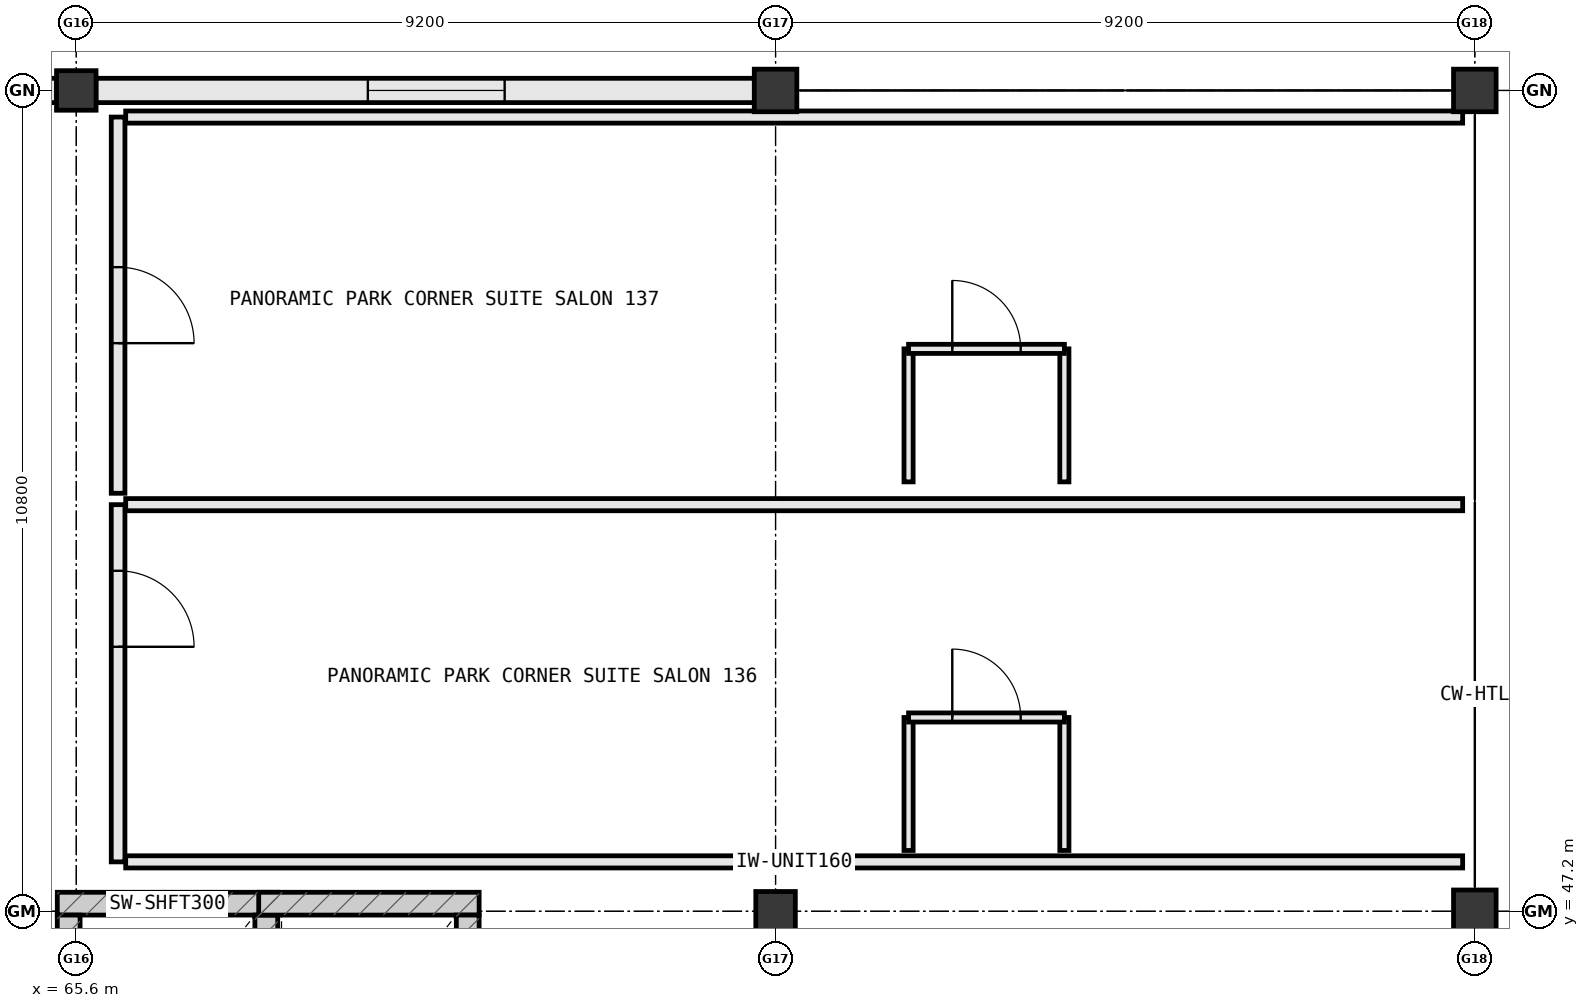
"""IFC4 building model, lengths in metres.
Left out: names, types, materials, properties, quantities, classifications, styles, units other than length and angle.
Written with IfcOpenShell. Run it as: python <this file> out.ifc"""

import sys

from ifc_helpers import new_model, si_unit, direction, frame, frame_2d, origin, origin_2d, place, context, subcontext, project, spatial, rectangle, extrude, element, fill, save


model = new_model("IFC4")
c1 = context("Model", 3, precision=1e-05, world=origin(), true_north=direction((0.0, 1.0)))
c2 = subcontext(c1, "Body", "Model", "MODEL_VIEW")
j1 = project(units=[si_unit("LENGTHUNIT", "METRE"), si_unit("PLANEANGLEUNIT", "RADIAN")], contexts=[c1])
p1 = place(None, origin())
s1 = spatial("IfcSite", under=j1, at=p1, CompositionType="ELEMENT")
p2 = place(p1, origin())
s2 = spatial("IfcBuilding", under=s1, at=p2, CompositionType="ELEMENT")
p3 = place(p2, frame((0.0, 0.0, 20.0)))
s3 = spatial("IfcBuildingStorey", under=s2, at=p3, CompositionType="ELEMENT", Elevation=20.0)
p4 = place(p3, frame((74.8, 47.2, 0.0), z_axis=(0.0, 0.0, 1.0), x_axis=(1.0, 0.0, 0.0)))
e1 = element("IfcColumn", 1, at=p4, inside=s3, PredefinedType="COLUMN", context=c2, shape_type="SweptSolid", body=[
    extrude(rectangle(XDim=0.52, YDim=0.52, at=origin_2d()), origin(), (0.0, 0.0, 1.0), 3.8),
])
for number, where, z_axis, x_axis in (
    (2, (74.8, 58.0, 0.0), (0.0, 0.0, 1.0), (1.0, 0.0, 0.0)),
    (3, (84.0, 47.2, 0.0), (0.0, 0.0, 1.0), (1.0, 0.0, 0.0)),
    (4, (84.0, 58.0, 0.0), (0.0, 0.0, 1.0), (1.0, 0.0, 0.0)),
):
    element("IfcColumn", number, at=place(p3, frame(where, z_axis=z_axis, x_axis=x_axis)), inside=s3, PredefinedType="COLUMN", context=c2, shape_type="SweptSolid", body=[
        extrude(rectangle(XDim=0.56, YDim=0.56, at=origin_2d()), origin(), (0.0, 0.0, 1.0), 3.8),
    ])
p5 = place(p3, frame((65.6, 58.0, 0.0), z_axis=(0.0, 0.0, 1.0), x_axis=(1.0, 0.0, 0.0)))
e5 = element("IfcColumn", 5, at=p5, inside=s3, PredefinedType="COLUMN", context=c2, shape_type="SweptSolid", body=[
    extrude(rectangle(XDim=0.52, YDim=0.52, at=origin_2d()), origin(), (0.0, 0.0, 1.0), 3.8),
])
p6 = place(p3, frame((74.522, 58.0, 0.0), z_axis=(0.0, 0.0, 1.0), x_axis=(-1.0, 0.0, 0.0)))
e6 = element("IfcWall", 6, at=p6, inside=s3, PredefinedType="STANDARD", context=c2, shape_type="SweptSolid", body=[
    extrude(rectangle(XDim=8.664, YDim=0.32, at=frame_2d((4.332, 0.0))), origin(), (0.0, 0.0, 1.0), 2.865),
])
p7 = place(p6, frame((3.286, 0.0, 0.85)))
e7 = element("IfcOpeningElement", 7, at=p7, cuts=e6, PredefinedType="OPENING", context=c2, shape_type="SweptSolid", body=[
    extrude(rectangle(XDim=1.8, YDim=1.85, at=frame_2d((0.9, 0.925))), frame((0.0, 0.172, 0.0), z_axis=(0.0, -1.0, 0.0), x_axis=(1.0, 0.0, 0.0)), (0.0, 0.0, 1.0), 0.344),
])
p8 = place(p3, frame((65.342, 58.0, 0.0), z_axis=(0.0, 0.0, 1.0), x_axis=(-1.0, 0.0, 0.0)))
e8 = element("IfcWall", 8, at=p8, inside=s3, PredefinedType="STANDARD", context=c2, shape_type="SweptSolid", body=[
    extrude(rectangle(XDim=4.264, YDim=0.32, at=frame_2d((2.132, 0.0))), origin(), (0.0, 0.0, 1.0), 2.865),
])
p9 = place(p8, frame((1.232, 0.0, 0.85)))
e9 = element("IfcOpeningElement", 9, at=p9, cuts=e8, PredefinedType="OPENING", context=c2, shape_type="SweptSolid", body=[
    extrude(rectangle(XDim=1.8, YDim=1.85, at=frame_2d((0.9, 0.925))), frame((0.0, 0.172, 0.0), z_axis=(0.0, -1.0, 0.0), x_axis=(1.0, 0.0, 0.0)), (0.0, 0.0, 1.0), 0.344),
])
for number, where, z_axis, x_axis in (
    (10, (68.25, 47.3, 0.0), (0.0, 0.0, 1.0), (-1.0, 0.0, 0.0)),
    (11, (68.1, 44.25, 0.0), (0.0, 0.0, 1.0), (0.0, 1.0, 0.0)),
    (12, (65.5, 47.15, 0.0), (0.0, 0.0, 1.0), (0.0, -1.0, 0.0)),
    (13, (70.9, 47.3, 0.0), (0.0, 0.0, 1.0), (-1.0, 0.0, 0.0)),
    (14, (70.75, 44.25, 0.0), (0.0, 0.0, 1.0), (0.0, 1.0, 0.0)),
):
    element("IfcWall", number, at=place(p3, frame(where, z_axis=z_axis, x_axis=x_axis)), inside=s3, PredefinedType="SHEAR", context=c2, shape_type="SweptSolid", body=[
        extrude(rectangle(XDim=2.9, YDim=0.3, at=frame_2d((1.45, 0.0))), origin(), (0.0, 0.0, 1.0), 3.8),
    ])
p10 = place(p3, frame((66.15, 52.55, 0.0), z_axis=(0.0, 0.0, 1.0), x_axis=(0.0, -1.0, 0.0)))
e15 = element("IfcWall", 15, at=p10, inside=s3, PredefinedType="PARTITIONING", context=c2, shape_type="SweptSolid", body=[
    extrude(rectangle(XDim=4.7, YDim=0.18, at=frame_2d((2.35, 0.0))), origin(), (0.0, 0.0, 1.0), 3.55),
])
p11 = place(p10, frame((0.87, 0.0, 0.0)))
e16 = element("IfcOpeningElement", 16, at=p11, cuts=e15, PredefinedType="OPENING", context=c2, shape_type="SweptSolid", body=[
    extrude(rectangle(XDim=1.0, YDim=2.2, at=frame_2d((0.5, 1.1))), frame((0.0, 0.102, 0.0), z_axis=(0.0, -1.0, 0.0), x_axis=(1.0, 0.0, 0.0)), (0.0, 0.0, 1.0), 0.204),
])
for number, where, z_axis, x_axis in (
    (17, (66.25, 47.85, 0.0), (0.0, 0.0, 1.0), (1.0, 0.0, 0.0)),
    (18, (66.25, 52.55, 0.0), (0.0, 0.0, 1.0), (1.0, 0.0, 0.0)),
):
    element("IfcWall", number, at=place(p3, frame(where, z_axis=z_axis, x_axis=x_axis)), inside=s3, PredefinedType="PARTITIONING", context=c2, shape_type="SweptSolid", body=[
        extrude(rectangle(XDim=17.59, YDim=0.16, at=frame_2d((8.795, 0.0))), origin(), (0.0, 0.0, 1.0), 3.55),
    ])
for number, where, z_axis, x_axis in (
    (19, (76.55, 48.0, 0.0), (0.0, 0.0, 1.0), (0.0, 1.0, 0.0)),
    (20, (78.6, 48.0, 0.0), (0.0, 0.0, 1.0), (0.0, 1.0, 0.0)),
):
    element("IfcWall", number, at=place(p3, frame(where, z_axis=z_axis, x_axis=x_axis)), inside=s3, PredefinedType="PARTITIONING", context=c2, shape_type="SweptSolid", body=[
        extrude(rectangle(XDim=1.75, YDim=0.12, at=frame_2d((0.875, 0.0))), origin(), (0.0, 0.0, 1.0), 3.55),
    ])
p12 = place(p3, frame((76.55, 49.75, 0.0), z_axis=(0.0, 0.0, 1.0), x_axis=(1.0, 0.0, 0.0)))
e21 = element("IfcWall", 21, at=p12, inside=s3, PredefinedType="PARTITIONING", context=c2, shape_type="SweptSolid", body=[
    extrude(rectangle(XDim=2.05, YDim=0.12, at=frame_2d((1.025, 0.0))), origin(), (0.0, 0.0, 1.0), 3.55),
])
p13 = place(p12, frame((0.575, 0.0, 0.0)))
e22 = element("IfcOpeningElement", 22, at=p13, cuts=e21, PredefinedType="OPENING", context=c2, shape_type="SweptSolid", body=[
    extrude(rectangle(XDim=0.9, YDim=2.15, at=frame_2d((0.45, 1.075))), frame((0.0, 0.072, 0.0), z_axis=(0.0, -1.0, 0.0), x_axis=(1.0, 0.0, 0.0)), (0.0, 0.0, 1.0), 0.144),
])
p14 = place(p3, frame((66.15, 57.65, 0.0), z_axis=(0.0, 0.0, 1.0), x_axis=(0.0, -1.0, 0.0)))
e23 = element("IfcWall", 23, at=p14, inside=s3, PredefinedType="PARTITIONING", context=c2, shape_type="SweptSolid", body=[
    extrude(rectangle(XDim=4.95, YDim=0.18, at=frame_2d((2.475, 0.0))), origin(), (0.0, 0.0, 1.0), 3.55),
])
p15 = place(p14, frame((1.975, 0.0, 0.0)))
e24 = element("IfcOpeningElement", 24, at=p15, cuts=e23, PredefinedType="OPENING", context=c2, shape_type="SweptSolid", body=[
    extrude(rectangle(XDim=1.0, YDim=2.2, at=frame_2d((0.5, 1.1))), frame((0.0, 0.102, 0.0), z_axis=(0.0, -1.0, 0.0), x_axis=(1.0, 0.0, 0.0)), (0.0, 0.0, 1.0), 0.204),
])
p16 = place(p3, frame((66.25, 57.65, 0.0), z_axis=(0.0, 0.0, 1.0), x_axis=(1.0, 0.0, 0.0)))
e25 = element("IfcWall", 25, at=p16, inside=s3, PredefinedType="PARTITIONING", context=c2, shape_type="SweptSolid", body=[
    extrude(rectangle(XDim=17.59, YDim=0.16, at=frame_2d((8.795, 0.0))), origin(), (0.0, 0.0, 1.0), 2.865),
])
for number, where, z_axis, x_axis in (
    (26, (76.55, 52.85, 0.0), (0.0, 0.0, 1.0), (0.0, 1.0, 0.0)),
    (27, (78.6, 52.85, 0.0), (0.0, 0.0, 1.0), (0.0, 1.0, 0.0)),
):
    element("IfcWall", number, at=place(p3, frame(where, z_axis=z_axis, x_axis=x_axis)), inside=s3, PredefinedType="PARTITIONING", context=c2, shape_type="SweptSolid", body=[
        extrude(rectangle(XDim=1.75, YDim=0.12, at=frame_2d((0.875, 0.0))), origin(), (0.0, 0.0, 1.0), 3.55),
    ])
p17 = place(p3, frame((76.55, 54.6, 0.0), z_axis=(0.0, 0.0, 1.0), x_axis=(1.0, 0.0, 0.0)))
e28 = element("IfcWall", 28, at=p17, inside=s3, PredefinedType="PARTITIONING", context=c2, shape_type="SweptSolid", body=[
    extrude(rectangle(XDim=2.05, YDim=0.12, at=frame_2d((1.025, 0.0))), origin(), (0.0, 0.0, 1.0), 3.55),
])
p18 = place(p17, frame((0.575, 0.0, 0.0)))
e29 = element("IfcOpeningElement", 29, at=p18, cuts=e28, PredefinedType="OPENING", context=c2, shape_type="SweptSolid", body=[
    extrude(rectangle(XDim=0.9, YDim=2.15, at=frame_2d((0.45, 1.075))), frame((0.0, 0.072, 0.0), z_axis=(0.0, -1.0, 0.0), x_axis=(1.0, 0.0, 0.0)), (0.0, 0.0, 1.0), 0.144),
])
p19 = place(p7, origin())
e30 = element("IfcWindow", 30, at=p19, inside=s3, PartitioningType="SINGLE_PANEL", PredefinedType="WINDOW", context=c2, shape_type="SweptSolid", body=[
    extrude(rectangle(XDim=1.8, YDim=1.85, at=frame_2d((0.9, 0.925))), frame((0.0, 0.03, 0.0), z_axis=(0.0, -1.0, 0.0), x_axis=(1.0, 0.0, 0.0)), (0.0, 0.0, 1.0), 0.06),
])
fill(e7, e30)
p20 = place(p11, origin())
e31 = element("IfcDoor", 31, at=p20, inside=s3, OperationType="SINGLE_SWING_RIGHT", PredefinedType="DOOR", context=c2, shape_type="SweptSolid", body=[
    extrude(rectangle(XDim=1.0, YDim=2.2, at=frame_2d((0.5, 1.1))), frame((0.0, 0.025, 0.0), z_axis=(0.0, -1.0, 0.0), x_axis=(1.0, 0.0, 0.0)), (0.0, 0.0, 1.0), 0.05),
])
fill(e16, e31)
p21 = place(p13, origin())
e32 = element("IfcDoor", 32, at=p21, inside=s3, OperationType="SINGLE_SWING_LEFT", PredefinedType="DOOR", context=c2, shape_type="SweptSolid", body=[
    extrude(rectangle(XDim=0.9, YDim=2.15, at=frame_2d((0.45, 1.075))), frame((0.0, 0.025, 0.0), z_axis=(0.0, -1.0, 0.0), x_axis=(1.0, 0.0, 0.0)), (0.0, 0.0, 1.0), 0.05),
])
fill(e22, e32)
p22 = place(p15, origin())
e33 = element("IfcDoor", 33, at=p22, inside=s3, OperationType="SINGLE_SWING_RIGHT", PredefinedType="DOOR", context=c2, shape_type="SweptSolid", body=[
    extrude(rectangle(XDim=1.0, YDim=2.2, at=frame_2d((0.5, 1.1))), frame((0.0, 0.025, 0.0), z_axis=(0.0, -1.0, 0.0), x_axis=(1.0, 0.0, 0.0)), (0.0, 0.0, 1.0), 0.05),
])
fill(e24, e33)
p23 = place(p18, origin())
e34 = element("IfcDoor", 34, at=p23, inside=s3, OperationType="SINGLE_SWING_LEFT", PredefinedType="DOOR", context=c2, shape_type="SweptSolid", body=[
    extrude(rectangle(XDim=0.9, YDim=2.15, at=frame_2d((0.45, 1.075))), frame((0.0, 0.025, 0.0), z_axis=(0.0, -1.0, 0.0), x_axis=(1.0, 0.0, 0.0)), (0.0, 0.0, 1.0), 0.05),
])
fill(e29, e34)
save(model, sys.argv[1])
